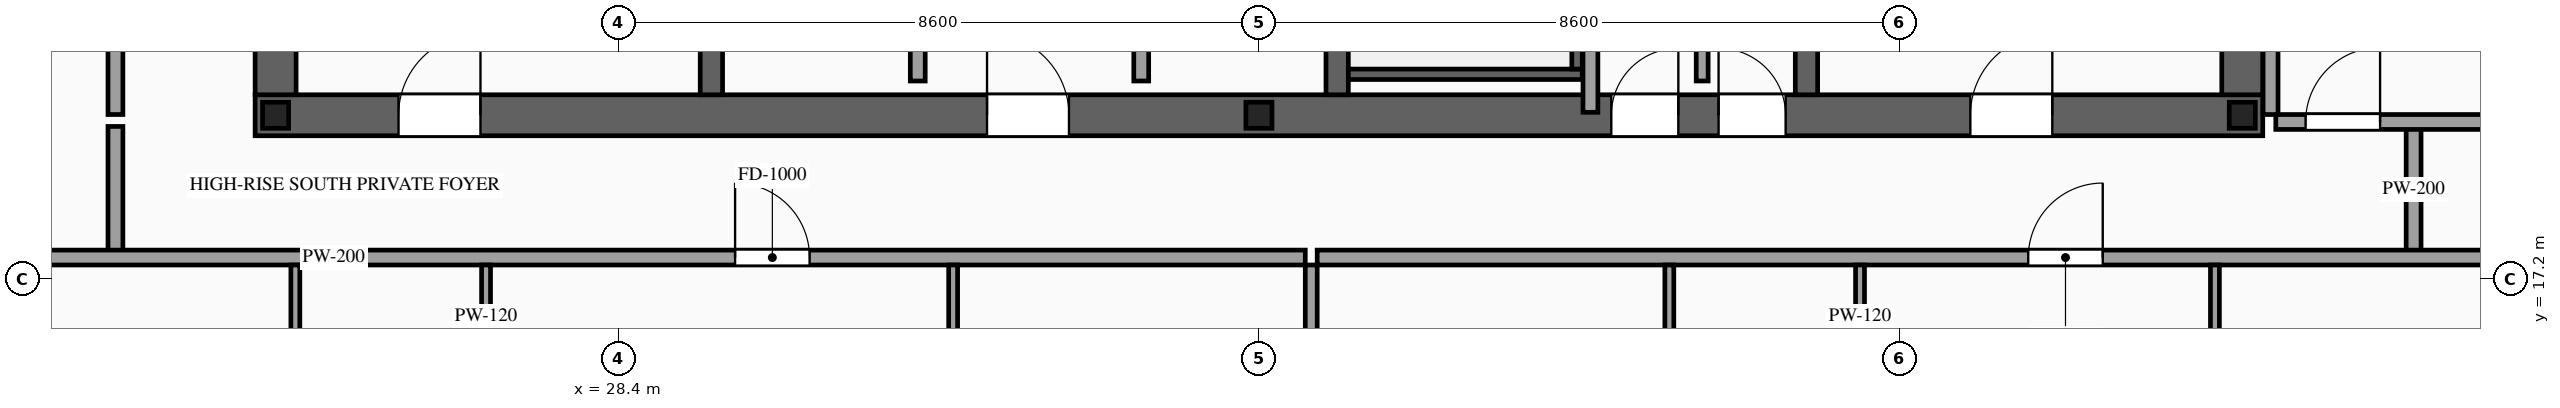
"""IFC4 building model, lengths in metres.
Left out: names, types, materials, properties, quantities, classifications, styles, units other than length and angle.
Written with IfcOpenShell. Run it as: python <this file> out.ifc"""

import sys

from ifc_helpers import new_model, si_unit, direction, frame, frame_2d, origin, origin_2d, place, context, subcontext, project, spatial, rectangle, i_section, extrude, source, transform, mapped, element, fill, save


model = new_model("IFC4")
c1 = context("Model", 3, precision=1e-05, world=origin(), true_north=direction((0.0, 1.0)))
c2 = subcontext(c1, "Body", "Model", "MODEL_VIEW")
j1 = project(units=[si_unit("LENGTHUNIT", "METRE"), si_unit("PLANEANGLEUNIT", "RADIAN")], contexts=[c1])
p1 = place(None, origin())
s1 = spatial("IfcSite", under=j1, at=p1, CompositionType="ELEMENT")
p2 = place(p1, origin())
s2 = spatial("IfcBuilding", under=s1, at=p2, CompositionType="ELEMENT")
p3 = place(p2, frame((0.0, 0.0, 278.6)))
s3 = spatial("IfcBuildingStorey", under=s2, at=p3, CompositionType="ELEMENT", Elevation=278.6)
p4 = place(p3, frame((23.525, 19.4, 0.0), z_axis=(0.0, 0.0, 1.0), x_axis=(1.0, 0.0, 0.0)))
e1 = element("IfcWall", 1, at=p4, inside=s3, PredefinedType="SHEAR", context=c2, shape_type="SweptSolid", body=[
    extrude(rectangle(XDim=26.95, YDim=0.55, at=frame_2d((13.475, 0.0))), origin(), (0.0, 0.0, 1.0), 3.5),
])
p5 = place(p4, frame((1.925, 0.0, 0.0)))
e2 = element("IfcOpeningElement", 2, at=p5, cuts=e1, PredefinedType="OPENING", context=c2, shape_type="SweptSolid", body=[
    extrude(rectangle(XDim=1.1, YDim=2.2, at=frame_2d((0.55, 1.1))), frame((0.0, 0.29, 0.0), z_axis=(0.0, -1.0, 0.0), x_axis=(1.0, 0.0, 0.0)), (0.0, 0.0, 1.0), 0.58),
])
p6 = place(p4, frame((9.825, 0.0, 0.0)))
e3 = element("IfcOpeningElement", 3, at=p6, cuts=e1, PredefinedType="OPENING", context=c2, shape_type="SweptSolid", body=[
    extrude(rectangle(XDim=1.1, YDim=2.2, at=frame_2d((0.55, 1.1))), frame((0.0, 0.29, 0.0), z_axis=(0.0, -1.0, 0.0), x_axis=(1.0, 0.0, 0.0)), (0.0, 0.0, 1.0), 0.58),
])
p7 = place(p4, frame((23.025, 0.0, 0.0)))
e4 = element("IfcOpeningElement", 4, at=p7, cuts=e1, PredefinedType="OPENING", context=c2, shape_type="SweptSolid", body=[
    extrude(rectangle(XDim=1.1, YDim=2.2, at=frame_2d((0.55, 1.1))), frame((0.0, 0.29, 0.0), z_axis=(0.0, -1.0, 0.0), x_axis=(1.0, 0.0, 0.0)), (0.0, 0.0, 1.0), 0.58),
])
p8 = place(p4, frame((19.645, 0.0, 0.0)))
e5 = element("IfcOpeningElement", 5, at=p8, cuts=e1, PredefinedType="OPENING", context=c2, shape_type="SweptSolid", body=[
    extrude(rectangle(XDim=0.9, YDim=2.15, at=frame_2d((0.45, 1.075))), frame((0.0, 0.29, 0.0), z_axis=(0.0, -1.0, 0.0), x_axis=(1.0, 0.0, 0.0)), (0.0, 0.0, 1.0), 0.58),
])
p9 = place(p4, frame((18.205, 0.0, 0.0)))
e6 = element("IfcOpeningElement", 6, at=p9, cuts=e1, PredefinedType="OPENING", context=c2, shape_type="SweptSolid", body=[
    extrude(rectangle(XDim=0.9, YDim=2.15, at=frame_2d((0.45, 1.075))), frame((0.0, 0.29, 0.0), z_axis=(0.0, -1.0, 0.0), x_axis=(1.0, 0.0, 0.0)), (0.0, 0.0, 1.0), 0.58),
])
m1 = source(origin(), c2, "Body", "SweptSolid", [
    extrude(rectangle(XDim=12.25, YDim=0.55, at=frame_2d((6.125, 0.0))), origin(), (0.0, 0.0, 1.0), 3.5),
])
for number, where, z_axis, x_axis in (
    (7, (23.8, 19.675, 0.0), (0.0, 0.0, 1.0), (0.0, 1.0, 0.0)),
    (8, (50.2, 19.675, 0.0), (0.0, 0.0, 1.0), (0.0, 1.0, 0.0)),
):
    element("IfcWall", number, at=place(p3, frame(where, z_axis=z_axis, x_axis=x_axis)), inside=s3, PredefinedType="SHEAR", context=c2, shape_type="MappedRepresentation", body=[
        mapped(m1, transform((0.0, 0.0, 0.0), scale=1.0)),
    ])
m2 = source(origin(), c2, "Body", "SweptSolid", [
    extrude(rectangle(XDim=12.25, YDim=0.3, at=frame_2d((6.125, 0.0))), origin(), (0.0, 0.0, 1.0), 3.5),
])
for number, where, z_axis, x_axis in (
    (9, (29.65, 19.675, 0.0), (0.0, 0.0, 1.0), (0.0, 1.0, 0.0)),
    (10, (38.05, 19.675, 0.0), (0.0, 0.0, 1.0), (0.0, 1.0, 0.0)),
):
    element("IfcWall", number, at=place(p3, frame(where, z_axis=z_axis, x_axis=x_axis)), inside=s3, PredefinedType="SOLIDWALL", context=c2, shape_type="MappedRepresentation", body=[
        mapped(m2, transform((0.0, 0.0, 0.0), scale=1.0)),
    ])
p10 = place(p3, frame((44.35, 19.675, 0.0), z_axis=(0.0, 0.0, 1.0), x_axis=(0.0, 1.0, 0.0)))
e11 = element("IfcWall", 11, at=p10, inside=s3, PredefinedType="SOLIDWALL", context=c2, shape_type="SweptSolid", body=[
    extrude(rectangle(XDim=12.25, YDim=0.3, at=frame_2d((6.125, 0.0))), origin(), (0.0, 0.0, 1.0), 3.5),
])
p11 = place(p10, frame((6.525, 0.0, 0.0)))
e12 = element("IfcOpeningElement", 12, at=p11, cuts=e11, PredefinedType="OPENING", context=c2, shape_type="SweptSolid", body=[
    extrude(rectangle(XDim=1.1, YDim=2.2, at=frame_2d((0.55, 1.1))), frame((0.0, 0.165, 0.0), z_axis=(0.0, -1.0, 0.0), x_axis=(1.0, 0.0, 0.0)), (0.0, 0.0, 1.0), 0.33),
])
p12 = place(p10, frame((8.625, 0.0, 0.0)))
e13 = element("IfcOpeningElement", 13, at=p12, cuts=e11, PredefinedType="OPENING", context=c2, shape_type="SweptSolid", body=[
    extrude(rectangle(XDim=1.1, YDim=2.2, at=frame_2d((0.55, 1.1))), frame((0.0, 0.165, 0.0), z_axis=(0.0, -1.0, 0.0), x_axis=(1.0, 0.0, 0.0)), (0.0, 0.0, 1.0), 0.33),
])
p13 = place(p10, frame((10.725, 0.0, 0.0)))
e14 = element("IfcOpeningElement", 14, at=p13, cuts=e11, PredefinedType="OPENING", context=c2, shape_type="SweptSolid", body=[
    extrude(rectangle(XDim=1.1, YDim=2.2, at=frame_2d((0.55, 1.1))), frame((0.0, 0.165, 0.0), z_axis=(0.0, -1.0, 0.0), x_axis=(1.0, 0.0, 0.0)), (0.0, 0.0, 1.0), 0.33),
])
m3 = source(origin(), c2, "Body", "SweptSolid", [
    extrude(i_section(OverallWidth=0.35, OverallDepth=0.35, WebThickness=0.012, FlangeThickness=0.019, at=origin_2d()), origin(), (0.0, 0.0, 1.0), 3.5),
])
for number, where, z_axis, x_axis in (
    (15, (23.8, 19.4, 0.0), (0.0, 0.0, 1.0), (1.0, 0.0, 0.0)),
    (16, (37.0, 19.4, 0.0), (0.0, 0.0, 1.0), (1.0, 0.0, 0.0)),
    (17, (50.2, 19.4, 0.0), (0.0, 0.0, 1.0), (1.0, 0.0, 0.0)),
):
    element("IfcColumn", number, at=place(p3, frame(where, z_axis=z_axis, x_axis=x_axis)), inside=s3, PredefinedType="COLUMN", context=c2, shape_type="MappedRepresentation", body=[
        mapped(m3, transform((0.0, 0.0, 0.0), scale=1.0)),
    ])
m4 = source(origin(), c2, "Body", "SweptSolid", [
    extrude(rectangle(XDim=3.14, YDim=0.14, at=frame_2d((1.57, 0.0))), origin(), (0.0, 0.0, 1.0), 3.28),
])
p14 = place(p3, frame((38.2, 19.95, 0.0), z_axis=(0.0, 0.0, 1.0), x_axis=(1.0, 0.0, 0.0)))
e18 = element("IfcWall", 18, at=p14, inside=s3, PredefinedType="SOLIDWALL", context=c2, shape_type="MappedRepresentation", body=[
    mapped(m4, transform((0.0, 0.0, 0.0), scale=1.0)),
])
m5 = source(origin(), c2, "Body", "SweptSolid", [
    extrude(rectangle(XDim=8.94, YDim=0.14, at=frame_2d((4.47, 0.0))), origin(), (0.0, 0.0, 1.0), 3.28),
])
p15 = place(p3, frame((41.27, 20.02, 0.0), z_axis=(0.0, 0.0, 1.0), x_axis=(0.0, 1.0, 0.0)))
e19 = element("IfcWall", 19, at=p15, inside=s3, PredefinedType="SOLIDWALL", context=c2, shape_type="MappedRepresentation", body=[
    mapped(m5, transform((0.0, 0.0, 0.0), scale=1.0)),
])
p16 = place(p3, frame((32.42, 19.86, 0.0), z_axis=(0.0, 0.0, 1.0), x_axis=(0.0, 1.0, 0.0)))
e20 = element("IfcWall", 20, at=p16, inside=s3, PredefinedType="PARTITIONING", context=c2, shape_type="SweptSolid", body=[
    extrude(rectangle(XDim=11.88, YDim=0.2, at=frame_2d((5.94, 0.0))), origin(), (0.0, 0.0, 1.0), 3.28),
])
p17 = place(p16, frame((5.49, 0.0, 0.0)))
e21 = element("IfcOpeningElement", 21, at=p17, cuts=e20, PredefinedType="OPENING", context=c2, shape_type="SweptSolid", body=[
    extrude(rectangle(XDim=0.9, YDim=2.15, at=frame_2d((0.45, 1.075))), frame((0.0, 0.115, 0.0), z_axis=(0.0, -1.0, 0.0), x_axis=(1.0, 0.0, 0.0)), (0.0, 0.0, 1.0), 0.23),
])
p18 = place(p3, frame((35.42, 19.86, 0.0), z_axis=(0.0, 0.0, 1.0), x_axis=(0.0, 1.0, 0.0)))
e22 = element("IfcWall", 22, at=p18, inside=s3, PredefinedType="PARTITIONING", context=c2, shape_type="SweptSolid", body=[
    extrude(rectangle(XDim=6.94, YDim=0.2, at=frame_2d((3.47, 0.0))), origin(), (0.0, 0.0, 1.0), 3.28),
])
p19 = place(p18, frame((3.02, 0.0, 0.0)))
e23 = element("IfcOpeningElement", 23, at=p19, cuts=e22, PredefinedType="OPENING", context=c2, shape_type="SweptSolid", body=[
    extrude(rectangle(XDim=0.9, YDim=2.15, at=frame_2d((0.45, 1.075))), frame((0.0, 0.115, 0.0), z_axis=(0.0, -1.0, 0.0), x_axis=(1.0, 0.0, 0.0)), (0.0, 0.0, 1.0), 0.23),
])
m6 = source(origin(), c2, "Body", "SweptSolid", [
    extrude(rectangle(XDim=1.34, YDim=0.16, at=frame_2d((0.67, 0.0))), origin(), (0.0, 0.0, 1.0), 3.28),
])
p20 = place(p3, frame((42.95, 19.86, 0.0), z_axis=(0.0, 0.0, 1.0), x_axis=(0.0, 1.0, 0.0)))
e24 = element("IfcWall", 24, at=p20, inside=s3, PredefinedType="PARTITIONING", context=c2, shape_type="MappedRepresentation", body=[
    mapped(m6, transform((0.0, 0.0, 0.0), scale=1.0)),
])
m7 = source(origin(), c2, "Body", "SweptSolid", [
    extrude(rectangle(XDim=6.06, YDim=0.2, at=frame_2d((3.03, 0.0))), origin(), (0.0, 0.0, 1.0), 3.28),
])
p21 = place(p3, frame((41.45, 19.44, 0.0), z_axis=(0.0, 0.0, 1.0), x_axis=(0.0, 1.0, 0.0)))
e25 = element("IfcWall", 25, at=p21, inside=s3, PredefinedType="PARTITIONING", context=c2, shape_type="MappedRepresentation", body=[
    mapped(m7, transform((0.0, 0.0, 0.0), scale=1.0)),
])
m8 = source(origin(), c2, "Body", "SweptSolid", [
    extrude(rectangle(XDim=1.7, YDim=0.2, at=frame_2d((0.85, 0.0))), origin(), (0.0, 0.0, 1.0), 3.28),
])
for number, where, z_axis, x_axis in (
    (26, (21.65, 17.55, 0.0), (0.0, 0.0, 1.0), (0.0, 1.0, 0.0)),
    (27, (52.5, 17.55, 0.0), (0.0, 0.0, 1.0), (0.0, 1.0, 0.0)),
):
    element("IfcWall", number, at=place(p3, frame(where, z_axis=z_axis, x_axis=x_axis)), inside=s3, PredefinedType="PARTITIONING", context=c2, shape_type="MappedRepresentation", body=[
        mapped(m8, transform((0.0, 0.0, 0.0), scale=1.0)),
    ])
p22 = place(p3, frame((19.44, 17.49, 0.0), z_axis=(0.0, 0.0, 1.0), x_axis=(1.0, 0.0, 0.0)))
e28 = element("IfcWall", 28, at=p22, inside=s3, PredefinedType="PARTITIONING", context=c2, shape_type="SweptSolid", body=[
    extrude(rectangle(XDim=18.182, YDim=0.2, at=frame_2d((9.091, 0.0))), origin(), (0.0, 0.0, 1.0), 3.28),
])
p23 = place(p22, frame((10.528, 0.0, 0.0)))
e29 = element("IfcOpeningElement", 29, at=p23, cuts=e28, PredefinedType="OPENING", context=c2, shape_type="SweptSolid", body=[
    extrude(rectangle(XDim=1.0, YDim=2.2, at=frame_2d((0.5, 1.1))), frame((0.0, 0.115, 0.0), z_axis=(0.0, -1.0, 0.0), x_axis=(1.0, 0.0, 0.0)), (0.0, 0.0, 1.0), 0.23),
])
m9 = source(origin(), c2, "Body", "SweptSolid", [
    extrude(rectangle(XDim=12.04, YDim=0.16, at=frame_2d((6.02, 0.0))), origin(), (0.0, 0.0, 1.0), 3.28),
])
p24 = place(p3, frame((37.702, 5.35, 0.0), z_axis=(0.0, 0.0, 1.0), x_axis=(0.0, 1.0, 0.0)))
e30 = element("IfcWall", 30, at=p24, inside=s3, PredefinedType="PARTITIONING", context=c2, shape_type="MappedRepresentation", body=[
    mapped(m9, transform((0.0, 0.0, 0.0), scale=1.0)),
])
m10 = source(origin(), c2, "Body", "SweptSolid", [
    extrude(rectangle(XDim=4.11, YDim=0.12, at=frame_2d((2.055, 0.0))), origin(), (0.0, 0.0, 1.0), 3.28),
])
p25 = place(p3, frame((24.065, 13.28, 0.0), z_axis=(0.0, 0.0, 1.0), x_axis=(0.0, 1.0, 0.0)))
e31 = element("IfcWall", 31, at=p25, inside=s3, PredefinedType="PARTITIONING", context=c2, shape_type="MappedRepresentation", body=[
    mapped(m10, transform((0.0, 0.0, 0.0), scale=1.0)),
])
p26 = place(p3, frame((26.625, 13.28, 0.0), z_axis=(0.0, 0.0, 1.0), x_axis=(0.0, 1.0, 0.0)))
e32 = element("IfcWall", 32, at=p26, inside=s3, PredefinedType="PARTITIONING", context=c2, shape_type="SweptSolid", body=[
    extrude(rectangle(XDim=4.11, YDim=0.12, at=frame_2d((2.055, 0.0))), origin(), (0.0, 0.0, 1.0), 3.28),
])
p27 = place(p26, frame((1.63, 0.0, 0.0)))
e33 = element("IfcOpeningElement", 33, at=p27, cuts=e32, PredefinedType="OPENING", context=c2, shape_type="SweptSolid", body=[
    extrude(rectangle(XDim=0.85, YDim=2.1, at=frame_2d((0.425, 1.05))), frame((0.0, 0.075, 0.0), z_axis=(0.0, -1.0, 0.0), x_axis=(1.0, 0.0, 0.0)), (0.0, 0.0, 1.0), 0.15),
])
p28 = place(p3, frame((32.895, 13.28, 0.0), z_axis=(0.0, 0.0, 1.0), x_axis=(0.0, 1.0, 0.0)))
e34 = element("IfcWall", 34, at=p28, inside=s3, PredefinedType="PARTITIONING", context=c2, shape_type="MappedRepresentation", body=[
    mapped(m10, transform((0.0, 0.0, 0.0), scale=1.0)),
])
p29 = place(p3, frame((37.782, 17.49, 0.0), z_axis=(0.0, 0.0, 1.0), x_axis=(1.0, 0.0, 0.0)))
e35 = element("IfcWall", 35, at=p29, inside=s3, PredefinedType="PARTITIONING", context=c2, shape_type="SweptSolid", body=[
    extrude(rectangle(XDim=16.778, YDim=0.2, at=frame_2d((8.389, 0.0))), origin(), (0.0, 0.0, 1.0), 3.28),
])
p30 = place(p29, frame((9.545, 0.0, 0.0)))
e36 = element("IfcOpeningElement", 36, at=p30, cuts=e35, PredefinedType="OPENING", context=c2, shape_type="SweptSolid", body=[
    extrude(rectangle(XDim=1.0, YDim=2.2, at=frame_2d((0.5, 1.1))), frame((0.0, 0.115, 0.0), z_axis=(0.0, -1.0, 0.0), x_axis=(1.0, 0.0, 0.0)), (0.0, 0.0, 1.0), 0.23),
])
p31 = place(p3, frame((42.509, 13.28, 0.0), z_axis=(0.0, 0.0, 1.0), x_axis=(0.0, 1.0, 0.0)))
e37 = element("IfcWall", 37, at=p31, inside=s3, PredefinedType="PARTITIONING", context=c2, shape_type="MappedRepresentation", body=[
    mapped(m10, transform((0.0, 0.0, 0.0), scale=1.0)),
])
p32 = place(p3, frame((45.069, 13.28, 0.0), z_axis=(0.0, 0.0, 1.0), x_axis=(0.0, 1.0, 0.0)))
e38 = element("IfcWall", 38, at=p32, inside=s3, PredefinedType="PARTITIONING", context=c2, shape_type="SweptSolid", body=[
    extrude(rectangle(XDim=4.11, YDim=0.12, at=frame_2d((2.055, 0.0))), origin(), (0.0, 0.0, 1.0), 3.28),
])
p33 = place(p32, frame((1.63, 0.0, 0.0)))
e39 = element("IfcOpeningElement", 39, at=p33, cuts=e38, PredefinedType="OPENING", context=c2, shape_type="SweptSolid", body=[
    extrude(rectangle(XDim=0.85, YDim=2.1, at=frame_2d((0.425, 1.05))), frame((0.0, 0.075, 0.0), z_axis=(0.0, -1.0, 0.0), x_axis=(1.0, 0.0, 0.0)), (0.0, 0.0, 1.0), 0.15),
])
p34 = place(p3, frame((49.833, 13.28, 0.0), z_axis=(0.0, 0.0, 1.0), x_axis=(0.0, 1.0, 0.0)))
e40 = element("IfcWall", 40, at=p34, inside=s3, PredefinedType="PARTITIONING", context=c2, shape_type="MappedRepresentation", body=[
    mapped(m10, transform((0.0, 0.0, 0.0), scale=1.0)),
])
p35 = place(p3, frame((21.65, 19.41, 0.0), z_axis=(0.0, 0.0, 1.0), x_axis=(0.0, 1.0, 0.0)))
e41 = element("IfcWall", 41, at=p35, inside=s3, PredefinedType="PARTITIONING", context=c2, shape_type="SweptSolid", body=[
    extrude(rectangle(XDim=12.78, YDim=0.2, at=frame_2d((6.39, 0.0))), origin(), (0.0, 0.0, 1.0), 3.28),
])
p36 = place(p35, frame((5.89, 0.0, 0.0)))
e42 = element("IfcOpeningElement", 42, at=p36, cuts=e41, PredefinedType="OPENING", context=c2, shape_type="SweptSolid", body=[
    extrude(rectangle(XDim=1.0, YDim=2.2, at=frame_2d((0.5, 1.1))), frame((0.0, 0.115, 0.0), z_axis=(0.0, -1.0, 0.0), x_axis=(1.0, 0.0, 0.0)), (0.0, 0.0, 1.0), 0.23),
])
p37 = place(p3, frame((50.65, 19.31, 0.0), z_axis=(0.0, 0.0, 1.0), x_axis=(1.0, 0.0, 0.0)))
e43 = element("IfcWall", 43, at=p37, inside=s3, PredefinedType="PARTITIONING", context=c2, shape_type="SweptSolid", body=[
    extrude(rectangle(XDim=6.8, YDim=0.2, at=frame_2d((3.4, 0.0))), origin(), (0.0, 0.0, 1.0), 2.825),
])
p38 = place(p37, frame((0.4, 0.0, 0.0)))
e44 = element("IfcOpeningElement", 44, at=p38, cuts=e43, PredefinedType="OPENING", context=c2, shape_type="SweptSolid", body=[
    extrude(rectangle(XDim=1.0, YDim=2.2, at=frame_2d((0.5, 1.1))), frame((0.0, 0.115, 0.0), z_axis=(0.0, -1.0, 0.0), x_axis=(1.0, 0.0, 0.0)), (0.0, 0.0, 1.0), 0.23),
])
m11 = source(origin(), c2, "Body", "SweptSolid", [
    extrude(rectangle(XDim=12.78, YDim=0.2, at=frame_2d((6.39, 0.0))), origin(), (0.0, 0.0, 1.0), 3.28),
])
p39 = place(p3, frame((50.58, 19.41, 0.0), z_axis=(0.0, 0.0, 1.0), x_axis=(0.0, 1.0, 0.0)))
e45 = element("IfcWall", 45, at=p39, inside=s3, PredefinedType="PARTITIONING", context=c2, shape_type="MappedRepresentation", body=[
    mapped(m11, transform((0.0, 0.0, 0.0), scale=1.0)),
])
m12 = source(origin(), c2, "Body", "SweptSolid", [
    extrude(rectangle(XDim=1.1, YDim=2.2, at=frame_2d((0.55, 1.1))), frame((0.0, 0.025, 0.0), z_axis=(0.0, -1.0, 0.0), x_axis=(1.0, 0.0, 0.0)), (0.0, 0.0, 1.0), 0.05),
])
p40 = place(p5, origin())
e46 = element("IfcDoor", 46, at=p40, inside=s3, OperationType="SINGLE_SWING_RIGHT", PredefinedType="DOOR", context=c2, shape_type="MappedRepresentation", body=[
    mapped(m12, transform((0.0, 0.0, 0.0), scale=1.0)),
])
fill(e2, e46)
p41 = place(p6, origin())
e47 = element("IfcDoor", 47, at=p41, inside=s3, OperationType="SINGLE_SWING_LEFT", PredefinedType="DOOR", context=c2, shape_type="MappedRepresentation", body=[
    mapped(m12, transform((0.0, 0.0, 0.0), scale=1.0)),
])
fill(e3, e47)
p42 = place(p7, origin())
e48 = element("IfcDoor", 48, at=p42, inside=s3, OperationType="SINGLE_SWING_RIGHT", PredefinedType="DOOR", context=c2, shape_type="MappedRepresentation", body=[
    mapped(m12, transform((0.0, 0.0, 0.0), scale=1.0)),
])
fill(e4, e48)
m13 = source(origin(), c2, "Body", "SweptSolid", [
    extrude(rectangle(XDim=0.9, YDim=2.15, at=frame_2d((0.45, 1.075))), frame((0.0, 0.025, 0.0), z_axis=(0.0, -1.0, 0.0), x_axis=(1.0, 0.0, 0.0)), (0.0, 0.0, 1.0), 0.05),
])
p43 = place(p8, origin())
e49 = element("IfcDoor", 49, at=p43, inside=s3, OperationType="SINGLE_SWING_LEFT", PredefinedType="DOOR", context=c2, shape_type="MappedRepresentation", body=[
    mapped(m13, transform((0.0, 0.0, 0.0), scale=1.0)),
])
fill(e5, e49)
p44 = place(p9, origin())
e50 = element("IfcDoor", 50, at=p44, inside=s3, OperationType="SINGLE_SWING_RIGHT", PredefinedType="DOOR", context=c2, shape_type="MappedRepresentation", body=[
    mapped(m13, transform((0.0, 0.0, 0.0), scale=1.0)),
])
fill(e6, e50)
m14 = source(origin(), c2, "Body", "SweptSolid", [
    extrude(rectangle(XDim=1.0, YDim=2.2, at=frame_2d((0.5, 1.1))), frame((0.0, 0.025, 0.0), z_axis=(0.0, -1.0, 0.0), x_axis=(1.0, 0.0, 0.0)), (0.0, 0.0, 1.0), 0.05),
])
p45 = place(p23, origin())
e51 = element("IfcDoor", 51, at=p45, inside=s3, OperationType="SINGLE_SWING_LEFT", PredefinedType="DOOR", context=c2, shape_type="MappedRepresentation", body=[
    mapped(m14, transform((0.0, 0.0, 0.0), scale=1.0)),
])
fill(e29, e51)
p46 = place(p30, origin())
e52 = element("IfcDoor", 52, at=p46, inside=s3, OperationType="SINGLE_SWING_RIGHT", PredefinedType="DOOR", context=c2, shape_type="MappedRepresentation", body=[
    mapped(m14, transform((0.0, 0.0, 0.0), scale=1.0)),
])
fill(e36, e52)
p47 = place(p38, origin())
e53 = element("IfcDoor", 53, at=p47, inside=s3, OperationType="SINGLE_SWING_RIGHT", PredefinedType="DOOR", context=c2, shape_type="MappedRepresentation", body=[
    mapped(m14, transform((0.0, 0.0, 0.0), scale=1.0)),
])
fill(e44, e53)
save(model, sys.argv[1])
